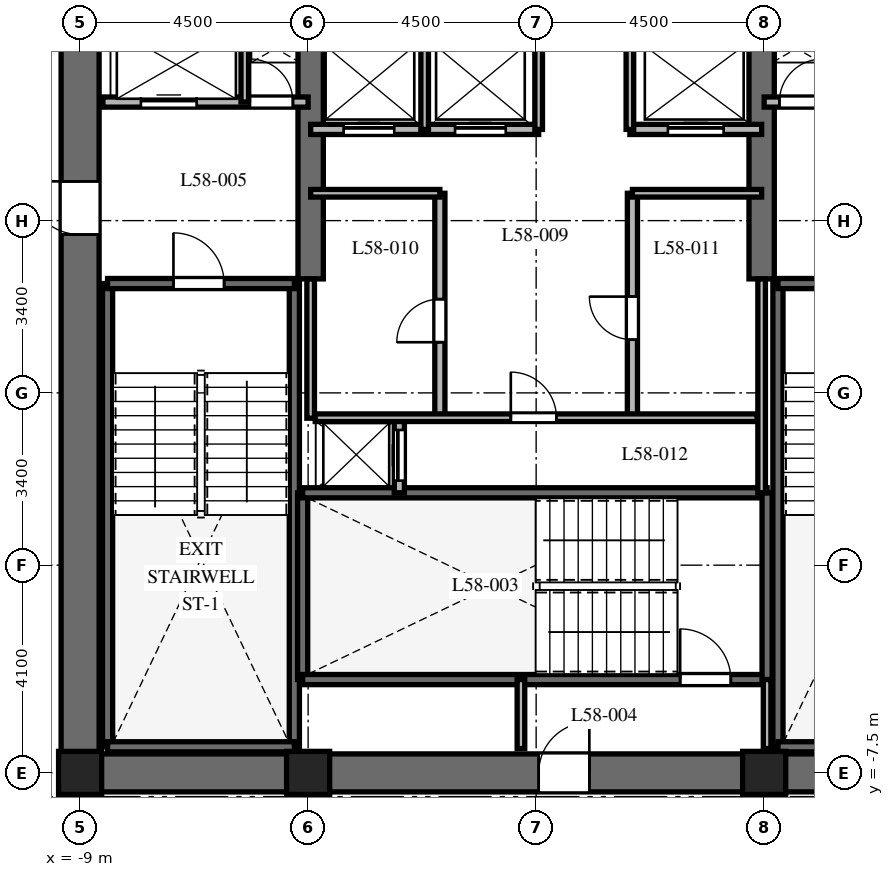
"""IFC4 building model, lengths in metres.
Left out: names, types, materials, properties, quantities, classifications, styles, units other than length and angle.
Written with IfcOpenShell. Run it as: python <this file> out.ifc"""

import sys

from ifc_helpers import new_model, si_unit, direction, frame, frame_2d, origin, origin_2d, place, context, subcontext, project, spatial, rectangle, extrude, element, fill, save


model = new_model("IFC4")
c1 = context("Model", 3, precision=1e-05, world=origin(), true_north=direction((0.0, 1.0)))
c2 = subcontext(c1, "Body", "Model", "MODEL_VIEW")
j1 = project(units=[si_unit("LENGTHUNIT", "METRE"), si_unit("PLANEANGLEUNIT", "RADIAN")], contexts=[c1])
p1 = place(None, origin())
s1 = spatial("IfcSite", under=j1, at=p1, CompositionType="ELEMENT")
p2 = place(p1, origin())
s2 = spatial("IfcBuilding", under=s1, at=p2, CompositionType="ELEMENT")
p3 = place(p2, frame((0.0, 0.0, 233.1)))
s3 = spatial("IfcBuildingStorey", under=s2, at=p3, CompositionType="ELEMENT", Elevation=233.1)
p4 = place(p3, frame((-9.375, -7.5, 0.0), z_axis=(0.0, 0.0, 1.0), x_axis=(1.0, 0.0, 0.0)))
e1 = element("IfcWall", 1, at=p4, inside=s3, PredefinedType="SHEAR", context=c2, shape_type="SweptSolid", body=[
    extrude(rectangle(XDim=18.75, YDim=0.75, at=frame_2d((9.375, 0.0))), origin(), (0.0, 0.0, 1.0), 3.8),
])
p5 = place(p4, frame((9.425, 0.0, 0.0)))
e2 = element("IfcOpeningElement", 2, at=p5, cuts=e1, PredefinedType="OPENING", context=c2, shape_type="SweptSolid", body=[
    extrude(rectangle(XDim=1.0, YDim=2.15, at=frame_2d((0.5, 1.075))), frame((0.0, 0.385, 0.0), z_axis=(0.0, -1.0, 0.0), x_axis=(1.0, 0.0, 0.0)), (0.0, 0.0, 1.0), 0.77),
])
p6 = place(p3, frame((-9.0, -7.125, 0.0), z_axis=(0.0, 0.0, 1.0), x_axis=(0.0, 1.0, 0.0)))
e3 = element("IfcWall", 3, at=p6, inside=s3, PredefinedType="SHEAR", context=c2, shape_type="SweptSolid", body=[
    extrude(rectangle(XDim=14.25, YDim=0.75, at=frame_2d((7.125, 0.0))), origin(), (0.0, 0.0, 1.0), 3.8),
])
p7 = place(p6, frame((10.25, 0.0, 0.0)))
e4 = element("IfcOpeningElement", 4, at=p7, cuts=e3, PredefinedType="OPENING", context=c2, shape_type="SweptSolid", body=[
    extrude(rectangle(XDim=1.05, YDim=2.15, at=frame_2d((0.525, 1.075))), frame((0.0, 0.385, 0.0), z_axis=(0.0, -1.0, 0.0), x_axis=(1.0, 0.0, 0.0)), (0.0, 0.0, 1.0), 0.77),
])
for number, where, z_axis, x_axis in (
    (5, (-4.45, 2.25, 0.0), (0.0, 0.0, 1.0), (0.0, 1.0, 0.0)),
    (6, (4.45, 2.25, 0.0), (0.0, 0.0, 1.0), (0.0, 1.0, 0.0)),
):
    element("IfcWall", number, at=place(p3, frame(where, z_axis=z_axis, x_axis=x_axis)), inside=s3, PredefinedType="SHEAR", context=c2, shape_type="SweptSolid", body=[
        extrude(rectangle(XDim=4.875, YDim=0.5, at=frame_2d((2.438, 0.0))), origin(), (0.0, 0.0, 1.0), 3.8),
    ])
for number, where, z_axis, x_axis in (
    (7, (-8.458, -6.985, 0.0), (0.0, 0.0, 1.0), (0.0, 1.0, 0.0)),
    (8, (-4.772, -6.985, 0.0), (0.0, 0.0, 1.0), (0.0, 1.0, 0.0)),
):
    element("IfcWall", number, at=place(p3, frame(where, z_axis=z_axis, x_axis=x_axis)), inside=s3, PredefinedType="SHEAR", context=c2, shape_type="SweptSolid", body=[
        extrude(rectangle(XDim=9.143, YDim=0.2, at=frame_2d((4.572, 0.0))), origin(), (0.0, 0.0, 1.0), 3.8),
    ])
p8 = place(p3, frame((-8.458, -6.985, 0.0), z_axis=(0.0, 0.0, 1.0), x_axis=(1.0, 0.0, 0.0)))
e9 = element("IfcWall", 9, at=p8, inside=s3, PredefinedType="SHEAR", context=c2, shape_type="SweptSolid", body=[
    extrude(rectangle(XDim=3.686, YDim=0.2, at=frame_2d((1.843, 0.0))), origin(), (0.0, 0.0, 1.0), 3.8),
])
p9 = place(p3, frame((-8.458, 2.158, 0.0), z_axis=(0.0, 0.0, 1.0), x_axis=(1.0, 0.0, 0.0)))
e10 = element("IfcWall", 10, at=p9, inside=s3, PredefinedType="SHEAR", context=c2, shape_type="SweptSolid", body=[
    extrude(rectangle(XDim=3.686, YDim=0.2, at=frame_2d((1.843, 0.0))), origin(), (0.0, 0.0, 1.0), 3.8),
])
p10 = place(p9, frame((1.3, 0.0, 0.0)))
e11 = element("IfcOpeningElement", 11, at=p10, cuts=e10, PredefinedType="OPENING", context=c2, shape_type="SweptSolid", body=[
    extrude(rectangle(XDim=1.0, YDim=2.15, at=frame_2d((0.5, 1.075))), frame((0.0, 0.11, 0.0), z_axis=(0.0, -1.0, 0.0), x_axis=(1.0, 0.0, 0.0)), (0.0, 0.0, 1.0), 0.22),
])
p11 = place(p3, frame((4.772, -6.985, 0.0), z_axis=(0.0, 0.0, 1.0), x_axis=(0.0, 1.0, 0.0)))
e12 = element("IfcWall", 12, at=p11, inside=s3, PredefinedType="SHEAR", context=c2, shape_type="SweptSolid", body=[
    extrude(rectangle(XDim=9.143, YDim=0.2, at=frame_2d((4.572, 0.0))), origin(), (0.0, 0.0, 1.0), 3.8),
])
p12 = place(p3, frame((4.772, -6.985, 0.0), z_axis=(0.0, 0.0, 1.0), x_axis=(1.0, 0.0, 0.0)))
e13 = element("IfcWall", 13, at=p12, inside=s3, PredefinedType="SHEAR", context=c2, shape_type="SweptSolid", body=[
    extrude(rectangle(XDim=3.686, YDim=0.2, at=frame_2d((1.843, 0.0))), origin(), (0.0, 0.0, 1.0), 3.8),
])
p13 = place(p3, frame((4.772, 2.158, 0.0), z_axis=(0.0, 0.0, 1.0), x_axis=(1.0, 0.0, 0.0)))
e14 = element("IfcWall", 14, at=p13, inside=s3, PredefinedType="SHEAR", context=c2, shape_type="SweptSolid", body=[
    extrude(rectangle(XDim=3.686, YDim=0.2, at=frame_2d((1.843, 0.0))), origin(), (0.0, 0.0, 1.0), 3.8),
])
p14 = place(p13, frame((1.35, 0.0, 0.0)))
e15 = element("IfcOpeningElement", 15, at=p14, cuts=e14, PredefinedType="OPENING", context=c2, shape_type="SweptSolid", body=[
    extrude(rectangle(XDim=1.0, YDim=2.15, at=frame_2d((0.5, 1.075))), frame((0.0, 0.11, 0.0), z_axis=(0.0, -1.0, 0.0), x_axis=(1.0, 0.0, 0.0)), (0.0, 0.0, 1.0), 0.22),
])
p15 = place(p3, frame((-4.608, -5.658, 0.0), z_axis=(0.0, 0.0, 1.0), x_axis=(0.0, 1.0, 0.0)))
e16 = element("IfcWall", 16, at=p15, inside=s3, PredefinedType="SHEAR", context=c2, shape_type="SweptSolid", body=[
    extrude(rectangle(XDim=3.686, YDim=0.2, at=frame_2d((1.843, 0.0))), origin(), (0.0, 0.0, 1.0), 3.8),
])
p16 = place(p3, frame((-4.608, -5.658, 0.0), z_axis=(0.0, 0.0, 1.0), x_axis=(1.0, 0.0, 0.0)))
e17 = element("IfcWall", 17, at=p16, inside=s3, PredefinedType="SHEAR", context=c2, shape_type="SweptSolid", body=[
    extrude(rectangle(XDim=9.166, YDim=0.2, at=frame_2d((4.583, 0.0))), origin(), (0.0, 0.0, 1.0), 3.8),
])
p17 = place(p16, frame((7.45, 0.0, 0.0)))
e18 = element("IfcOpeningElement", 18, at=p17, cuts=e17, PredefinedType="OPENING", context=c2, shape_type="SweptSolid", body=[
    extrude(rectangle(XDim=1.0, YDim=2.15, at=frame_2d((0.5, 1.075))), frame((0.0, 0.11, 0.0), z_axis=(0.0, -1.0, 0.0), x_axis=(1.0, 0.0, 0.0)), (0.0, 0.0, 1.0), 0.22),
])
p18 = place(p3, frame((-4.608, -1.972, 0.0), z_axis=(0.0, 0.0, 1.0), x_axis=(1.0, 0.0, 0.0)))
e19 = element("IfcWall", 19, at=p18, inside=s3, PredefinedType="SHEAR", context=c2, shape_type="SweptSolid", body=[
    extrude(rectangle(XDim=9.166, YDim=0.2, at=frame_2d((4.583, 0.0))), origin(), (0.0, 0.0, 1.0), 3.8),
])
p19 = place(p3, frame((4.558, -5.658, 0.0), z_axis=(0.0, 0.0, 1.0), x_axis=(0.0, 1.0, 0.0)))
e20 = element("IfcWall", 20, at=p19, inside=s3, PredefinedType="SHEAR", context=c2, shape_type="SweptSolid", body=[
    extrude(rectangle(XDim=3.686, YDim=0.2, at=frame_2d((1.843, 0.0))), origin(), (0.0, 0.0, 1.0), 3.8),
])
for number, where, z_axis, x_axis in (
    (21, (-9.0, -7.5, 0.0), (0.0, 0.0, 1.0), (1.0, 0.0, 0.0)),
    (22, (-4.5, -7.5, 0.0), (0.0, 0.0, 1.0), (1.0, 0.0, 0.0)),
    (23, (4.5, -7.5, 0.0), (0.0, 0.0, 1.0), (1.0, 0.0, 0.0)),
):
    element("IfcColumn", number, at=place(p3, frame(where, z_axis=z_axis, x_axis=x_axis)), inside=s3, PredefinedType="COLUMN", context=c2, shape_type="SweptSolid", body=[
        extrude(rectangle(XDim=0.85, YDim=0.85, at=origin_2d()), origin(), (0.0, 0.0, 1.0), 3.8),
    ])
for number, where, z_axis, x_axis in (
    (24, (-0.3, -7.02, 0.0), (0.0, 0.0, 1.0), (0.0, 1.0, 0.0)),
    (25, (4.558, -7.02, 0.0), (0.0, 0.0, 1.0), (0.0, 1.0, 0.0)),
):
    element("IfcWall", number, at=place(p3, frame(where, z_axis=z_axis, x_axis=x_axis)), inside=s3, PredefinedType="PARTITIONING", context=c2, shape_type="SweptSolid", body=[
        extrude(rectangle(XDim=1.362, YDim=0.15, at=frame_2d((0.681, 0.0))), origin(), (0.0, 0.0, 1.0), 3.5),
    ])
p20 = place(p3, frame((-8.55, 5.74, 0.0), z_axis=(0.0, 0.0, 1.0), x_axis=(1.0, 0.0, 0.0)))
e26 = element("IfcWall", 26, at=p20, inside=s3, PredefinedType="PARTITIONING", context=c2, shape_type="SweptSolid", body=[
    extrude(rectangle(XDim=4.05, YDim=0.2, at=frame_2d((2.025, 0.0))), origin(), (0.0, 0.0, 1.0), 3.5),
])
p21 = place(p20, frame((0.75, 0.0, 0.0)))
e27 = element("IfcOpeningElement", 27, at=p21, cuts=e26, PredefinedType="OPENING", context=c2, shape_type="SweptSolid", body=[
    extrude(rectangle(XDim=1.1, YDim=2.2, at=frame_2d((0.55, 1.1))), frame((0.0, 0.11, 0.0), z_axis=(0.0, -1.0, 0.0), x_axis=(1.0, 0.0, 0.0)), (0.0, 0.0, 1.0), 0.22),
])
p22 = place(p20, frame((2.9, 0.0, 0.0)))
e28 = element("IfcOpeningElement", 28, at=p22, cuts=e26, PredefinedType="OPENING", context=c2, shape_type="SweptSolid", body=[
    extrude(rectangle(XDim=0.85, YDim=2.03, at=frame_2d((0.425, 1.015))), frame((0.0, 0.11, 0.0), z_axis=(0.0, -1.0, 0.0), x_axis=(1.0, 0.0, 0.0)), (0.0, 0.0, 1.0), 0.22),
])
p23 = place(p3, frame((-5.75, 5.74, 0.0), z_axis=(0.0, 0.0, 1.0), x_axis=(0.0, 1.0, 0.0)))
e29 = element("IfcWall", 29, at=p23, inside=s3, PredefinedType="PARTITIONING", context=c2, shape_type="SweptSolid", body=[
    extrude(rectangle(XDim=1.41, YDim=0.15, at=frame_2d((0.705, 0.0))), origin(), (0.0, 0.0, 1.0), 3.5),
])
p24 = place(p3, frame((4.5, 5.74, 0.0), z_axis=(0.0, 0.0, 1.0), x_axis=(1.0, 0.0, 0.0)))
e30 = element("IfcWall", 30, at=p24, inside=s3, PredefinedType="PARTITIONING", context=c2, shape_type="SweptSolid", body=[
    extrude(rectangle(XDim=4.05, YDim=0.2, at=frame_2d((2.025, 0.0))), origin(), (0.0, 0.0, 1.0), 3.5),
])
p25 = place(p24, frame((0.3, 0.0, 0.0)))
e31 = element("IfcOpeningElement", 31, at=p25, cuts=e30, PredefinedType="OPENING", context=c2, shape_type="SweptSolid", body=[
    extrude(rectangle(XDim=0.85, YDim=2.03, at=frame_2d((0.425, 1.015))), frame((0.0, 0.11, 0.0), z_axis=(0.0, -1.0, 0.0), x_axis=(1.0, 0.0, 0.0)), (0.0, 0.0, 1.0), 0.22),
])
p26 = place(p24, frame((2.15, 0.0, 0.0)))
e32 = element("IfcOpeningElement", 32, at=p26, cuts=e30, PredefinedType="OPENING", context=c2, shape_type="SweptSolid", body=[
    extrude(rectangle(XDim=1.1, YDim=2.2, at=frame_2d((0.55, 1.1))), frame((0.0, 0.11, 0.0), z_axis=(0.0, -1.0, 0.0), x_axis=(1.0, 0.0, 0.0)), (0.0, 0.0, 1.0), 0.22),
])
p27 = place(p3, frame((-2.7, -1.972, 0.0), z_axis=(0.0, 0.0, 1.0), x_axis=(0.0, 1.0, 0.0)))
e33 = element("IfcWall", 33, at=p27, inside=s3, PredefinedType="PARTITIONING", context=c2, shape_type="SweptSolid", body=[
    extrude(rectangle(XDim=1.472, YDim=0.2, at=frame_2d((0.736, 0.0))), origin(), (0.0, 0.0, 1.0), 3.5),
])
p28 = place(p27, frame((0.24, 0.0, 0.0)))
e34 = element("IfcOpeningElement", 34, at=p28, cuts=e33, PredefinedType="OPENING", context=c2, shape_type="SweptSolid", body=[
    extrude(rectangle(XDim=1.0, YDim=2.2, at=frame_2d((0.5, 1.1))), frame((0.0, 0.11, 0.0), z_axis=(0.0, -1.0, 0.0), x_axis=(1.0, 0.0, 0.0)), (0.0, 0.0, 1.0), 0.22),
])
p29 = place(p3, frame((-4.45, 5.2, 0.0), z_axis=(0.0, 0.0, 1.0), x_axis=(1.0, 0.0, 0.0)))
e35 = element("IfcWall", 35, at=p29, inside=s3, PredefinedType="PARTITIONING", context=c2, shape_type="SweptSolid", body=[
    extrude(rectangle(XDim=4.5, YDim=0.2, at=frame_2d((2.25, 0.0))), origin(), (0.0, 0.0, 1.0), 3.5),
])
p30 = place(p29, frame((0.65, 0.0, 0.0)))
e36 = element("IfcOpeningElement", 36, at=p30, cuts=e35, PredefinedType="OPENING", context=c2, shape_type="SweptSolid", body=[
    extrude(rectangle(XDim=1.0, YDim=2.2, at=frame_2d((0.5, 1.1))), frame((0.0, 0.11, 0.0), z_axis=(0.0, -1.0, 0.0), x_axis=(1.0, 0.0, 0.0)), (0.0, 0.0, 1.0), 0.22),
])
p31 = place(p29, frame((2.85, 0.0, 0.0)))
e37 = element("IfcOpeningElement", 37, at=p31, cuts=e35, PredefinedType="OPENING", context=c2, shape_type="SweptSolid", body=[
    extrude(rectangle(XDim=1.0, YDim=2.2, at=frame_2d((0.5, 1.1))), frame((0.0, 0.11, 0.0), z_axis=(0.0, -1.0, 0.0), x_axis=(1.0, 0.0, 0.0)), (0.0, 0.0, 1.0), 0.22),
])
p32 = place(p3, frame((1.85, 5.2, 0.0), z_axis=(0.0, 0.0, 1.0), x_axis=(1.0, 0.0, 0.0)))
e38 = element("IfcWall", 38, at=p32, inside=s3, PredefinedType="PARTITIONING", context=c2, shape_type="SweptSolid", body=[
    extrude(rectangle(XDim=2.6, YDim=0.2, at=frame_2d((1.3, 0.0))), origin(), (0.0, 0.0, 1.0), 3.5),
])
p33 = place(p32, frame((0.75, 0.0, 0.0)))
e39 = element("IfcOpeningElement", 39, at=p33, cuts=e38, PredefinedType="OPENING", context=c2, shape_type="SweptSolid", body=[
    extrude(rectangle(XDim=1.1, YDim=2.2, at=frame_2d((0.55, 1.1))), frame((0.0, 0.11, 0.0), z_axis=(0.0, -1.0, 0.0), x_axis=(1.0, 0.0, 0.0)), (0.0, 0.0, 1.0), 0.22),
])
p34 = place(p3, frame((-2.2, 5.2, 0.0), z_axis=(0.0, 0.0, 1.0), x_axis=(0.0, 1.0, 0.0)))
e40 = element("IfcWall", 40, at=p34, inside=s3, PredefinedType="PARTITIONING", context=c2, shape_type="SweptSolid", body=[
    extrude(rectangle(XDim=1.85, YDim=0.15, at=frame_2d((0.925, 0.0))), origin(), (0.0, 0.0, 1.0), 3.5),
])
for number, where, z_axis, x_axis in (
    (41, (0.05, 5.2, 0.0), (0.0, 0.0, 1.0), (0.0, 1.0, 0.0)),
    (42, (1.85, 5.2, 0.0), (0.0, 0.0, 1.0), (0.0, 1.0, 0.0)),
):
    element("IfcWall", number, at=place(p3, frame(where, z_axis=z_axis, x_axis=x_axis)), inside=s3, PredefinedType="PARTITIONING", context=c2, shape_type="SweptSolid", body=[
        extrude(rectangle(XDim=1.95, YDim=0.15, at=frame_2d((0.975, 0.0))), origin(), (0.0, 0.0, 1.0), 3.5),
    ])
p35 = place(p3, frame((-4.45, -0.5, 0.0), z_axis=(0.0, 0.0, 1.0), x_axis=(0.0, 1.0, 0.0)))
e43 = element("IfcWall", 43, at=p35, inside=s3, PredefinedType="PARTITIONING", context=c2, shape_type="SweptSolid", body=[
    extrude(rectangle(XDim=2.75, YDim=0.15, at=frame_2d((1.375, 0.0))), origin(), (0.0, 0.0, 1.0), 3.5),
])
p36 = place(p3, frame((4.45, -1.972, 0.0), z_axis=(0.0, 0.0, 1.0), x_axis=(0.0, 1.0, 0.0)))
e44 = element("IfcWall", 44, at=p36, inside=s3, PredefinedType="PARTITIONING", context=c2, shape_type="SweptSolid", body=[
    extrude(rectangle(XDim=4.222, YDim=0.15, at=frame_2d((2.111, 0.0))), origin(), (0.0, 0.0, 1.0), 3.5),
])
p37 = place(p3, frame((-1.9, -0.5, 0.0), z_axis=(0.0, 0.0, 1.0), x_axis=(0.0, 1.0, 0.0)))
e45 = element("IfcWall", 45, at=p37, inside=s3, PredefinedType="PARTITIONING", context=c2, shape_type="SweptSolid", body=[
    extrude(rectangle(XDim=4.44, YDim=0.2, at=frame_2d((2.22, 0.0))), origin(), (0.0, 0.0, 1.0), 3.5),
])
p38 = place(p37, frame((1.5, 0.0, 0.0)))
e46 = element("IfcOpeningElement", 46, at=p38, cuts=e45, PredefinedType="OPENING", context=c2, shape_type="SweptSolid", body=[
    extrude(rectangle(XDim=0.85, YDim=2.03, at=frame_2d((0.425, 1.015))), frame((0.0, 0.11, 0.0), z_axis=(0.0, -1.0, 0.0), x_axis=(1.0, 0.0, 0.0)), (0.0, 0.0, 1.0), 0.22),
])
p39 = place(p3, frame((-4.45, 3.94, 0.0), z_axis=(0.0, 0.0, 1.0), x_axis=(1.0, 0.0, 0.0)))
e47 = element("IfcWall", 47, at=p39, inside=s3, PredefinedType="PARTITIONING", context=c2, shape_type="SweptSolid", body=[
    extrude(rectangle(XDim=2.55, YDim=0.15, at=frame_2d((1.275, 0.0))), origin(), (0.0, 0.0, 1.0), 3.5),
])
p40 = place(p3, frame((1.9, -0.5, 0.0), z_axis=(0.0, 0.0, 1.0), x_axis=(0.0, 1.0, 0.0)))
e48 = element("IfcWall", 48, at=p40, inside=s3, PredefinedType="PARTITIONING", context=c2, shape_type="SweptSolid", body=[
    extrude(rectangle(XDim=4.44, YDim=0.2, at=frame_2d((2.22, 0.0))), origin(), (0.0, 0.0, 1.0), 3.5),
])
p41 = place(p40, frame((1.55, 0.0, 0.0)))
e49 = element("IfcOpeningElement", 49, at=p41, cuts=e48, PredefinedType="OPENING", context=c2, shape_type="SweptSolid", body=[
    extrude(rectangle(XDim=0.85, YDim=2.03, at=frame_2d((0.425, 1.015))), frame((0.0, 0.11, 0.0), z_axis=(0.0, -1.0, 0.0), x_axis=(1.0, 0.0, 0.0)), (0.0, 0.0, 1.0), 0.22),
])
p42 = place(p3, frame((1.9, 3.94, 0.0), z_axis=(0.0, 0.0, 1.0), x_axis=(1.0, 0.0, 0.0)))
e50 = element("IfcWall", 50, at=p42, inside=s3, PredefinedType="PARTITIONING", context=c2, shape_type="SweptSolid", body=[
    extrude(rectangle(XDim=2.55, YDim=0.15, at=frame_2d((1.275, 0.0))), origin(), (0.0, 0.0, 1.0), 3.5),
])
p43 = place(p3, frame((-4.36, -0.49, 0.0), z_axis=(0.0, 0.0, 1.0), x_axis=(1.0, 0.0, 0.0)))
e51 = element("IfcWall", 51, at=p43, inside=s3, PredefinedType="PARTITIONING", context=c2, shape_type="SweptSolid", body=[
    extrude(rectangle(XDim=8.72, YDim=0.15, at=frame_2d((4.36, 0.0))), origin(), (0.0, 0.0, 1.0), 3.5),
])
p44 = place(p43, frame((3.86, 0.0, 0.0)))
e52 = element("IfcOpeningElement", 52, at=p44, cuts=e51, PredefinedType="OPENING", context=c2, shape_type="SweptSolid", body=[
    extrude(rectangle(XDim=0.9, YDim=2.03, at=frame_2d((0.45, 1.015))), frame((0.0, 0.085, 0.0), z_axis=(0.0, -1.0, 0.0), x_axis=(1.0, 0.0, 0.0)), (0.0, 0.0, 1.0), 0.17),
])
p45 = place(p10, origin())
e53 = element("IfcDoor", 53, at=p45, inside=s3, OperationType="SINGLE_SWING_LEFT", PredefinedType="DOOR", context=c2, shape_type="SweptSolid", body=[
    extrude(rectangle(XDim=1.0, YDim=2.15, at=frame_2d((0.5, 1.075))), frame((0.0, 0.025, 0.0), z_axis=(0.0, -1.0, 0.0), x_axis=(1.0, 0.0, 0.0)), (0.0, 0.0, 1.0), 0.05),
])
fill(e11, e53)
p46 = place(p17, origin())
e54 = element("IfcDoor", 54, at=p46, inside=s3, OperationType="SINGLE_SWING_LEFT", PredefinedType="DOOR", context=c2, shape_type="SweptSolid", body=[
    extrude(rectangle(XDim=1.0, YDim=2.15, at=frame_2d((0.5, 1.075))), frame((0.0, 0.025, 0.0), z_axis=(0.0, -1.0, 0.0), x_axis=(1.0, 0.0, 0.0)), (0.0, 0.0, 1.0), 0.05),
])
fill(e18, e54)
p47 = place(p5, origin())
e55 = element("IfcDoor", 55, at=p47, inside=s3, OperationType="SINGLE_SWING_RIGHT", PredefinedType="DOOR", context=c2, shape_type="SweptSolid", body=[
    extrude(rectangle(XDim=1.0, YDim=2.15, at=frame_2d((0.5, 1.075))), frame((0.0, 0.025, 0.0), z_axis=(0.0, -1.0, 0.0), x_axis=(1.0, 0.0, 0.0)), (0.0, 0.0, 1.0), 0.05),
])
fill(e2, e55)
p48 = place(p7, origin())
e56 = element("IfcDoor", 56, at=p48, inside=s3, OperationType="SINGLE_SWING_RIGHT", PredefinedType="DOOR", context=c2, shape_type="SweptSolid", body=[
    extrude(rectangle(XDim=1.05, YDim=2.15, at=frame_2d((0.525, 1.075))), frame((0.0, 0.025, 0.0), z_axis=(0.0, -1.0, 0.0), x_axis=(1.0, 0.0, 0.0)), (0.0, 0.0, 1.0), 0.05),
])
fill(e4, e56)
p49 = place(p21, origin())
e57 = element("IfcDoor", 57, at=p49, inside=s3, OperationType="SLIDING_TO_LEFT", PredefinedType="DOOR", context=c2, shape_type="SweptSolid", body=[
    extrude(rectangle(XDim=1.1, YDim=2.2, at=frame_2d((0.55, 1.1))), frame((0.0, 0.025, 0.0), z_axis=(0.0, -1.0, 0.0), x_axis=(1.0, 0.0, 0.0)), (0.0, 0.0, 1.0), 0.05),
])
fill(e27, e57)
p50 = place(p22, origin())
e58 = element("IfcDoor", 58, at=p50, inside=s3, OperationType="SINGLE_SWING_LEFT", PredefinedType="DOOR", context=c2, shape_type="SweptSolid", body=[
    extrude(rectangle(XDim=0.85, YDim=2.03, at=frame_2d((0.425, 1.015))), frame((0.0, 0.025, 0.0), z_axis=(0.0, -1.0, 0.0), x_axis=(1.0, 0.0, 0.0)), (0.0, 0.0, 1.0), 0.05),
])
fill(e28, e58)
p51 = place(p25, origin())
e59 = element("IfcDoor", 59, at=p51, inside=s3, OperationType="SINGLE_SWING_RIGHT", PredefinedType="DOOR", context=c2, shape_type="SweptSolid", body=[
    extrude(rectangle(XDim=0.85, YDim=2.03, at=frame_2d((0.425, 1.015))), frame((0.0, 0.025, 0.0), z_axis=(0.0, -1.0, 0.0), x_axis=(1.0, 0.0, 0.0)), (0.0, 0.0, 1.0), 0.05),
])
fill(e31, e59)
p52 = place(p28, origin())
e60 = element("IfcDoor", 60, at=p52, inside=s3, OperationType="SLIDING_TO_LEFT", PredefinedType="DOOR", context=c2, shape_type="SweptSolid", body=[
    extrude(rectangle(XDim=1.0, YDim=2.2, at=frame_2d((0.5, 1.1))), frame((0.0, 0.025, 0.0), z_axis=(0.0, -1.0, 0.0), x_axis=(1.0, 0.0, 0.0)), (0.0, 0.0, 1.0), 0.05),
])
fill(e34, e60)
p53 = place(p30, origin())
e61 = element("IfcDoor", 61, at=p53, inside=s3, OperationType="SLIDING_TO_LEFT", PredefinedType="DOOR", context=c2, shape_type="SweptSolid", body=[
    extrude(rectangle(XDim=1.0, YDim=2.2, at=frame_2d((0.5, 1.1))), frame((0.0, 0.025, 0.0), z_axis=(0.0, -1.0, 0.0), x_axis=(1.0, 0.0, 0.0)), (0.0, 0.0, 1.0), 0.05),
])
fill(e36, e61)
p54 = place(p31, origin())
e62 = element("IfcDoor", 62, at=p54, inside=s3, OperationType="SLIDING_TO_RIGHT", PredefinedType="DOOR", context=c2, shape_type="SweptSolid", body=[
    extrude(rectangle(XDim=1.0, YDim=2.2, at=frame_2d((0.5, 1.1))), frame((0.0, 0.025, 0.0), z_axis=(0.0, -1.0, 0.0), x_axis=(1.0, 0.0, 0.0)), (0.0, 0.0, 1.0), 0.05),
])
fill(e37, e62)
p55 = place(p33, origin())
e63 = element("IfcDoor", 63, at=p55, inside=s3, OperationType="SLIDING_TO_RIGHT", PredefinedType="DOOR", context=c2, shape_type="SweptSolid", body=[
    extrude(rectangle(XDim=1.1, YDim=2.2, at=frame_2d((0.55, 1.1))), frame((0.0, 0.025, 0.0), z_axis=(0.0, -1.0, 0.0), x_axis=(1.0, 0.0, 0.0)), (0.0, 0.0, 1.0), 0.05),
])
fill(e39, e63)
p56 = place(p38, origin())
e64 = element("IfcDoor", 64, at=p56, inside=s3, OperationType="SINGLE_SWING_LEFT", PredefinedType="DOOR", context=c2, shape_type="SweptSolid", body=[
    extrude(rectangle(XDim=0.85, YDim=2.03, at=frame_2d((0.425, 1.015))), frame((0.0, 0.025, 0.0), z_axis=(0.0, -1.0, 0.0), x_axis=(1.0, 0.0, 0.0)), (0.0, 0.0, 1.0), 0.05),
])
fill(e46, e64)
p57 = place(p41, origin())
e65 = element("IfcDoor", 65, at=p57, inside=s3, OperationType="SINGLE_SWING_RIGHT", PredefinedType="DOOR", context=c2, shape_type="SweptSolid", body=[
    extrude(rectangle(XDim=0.85, YDim=2.03, at=frame_2d((0.425, 1.015))), frame((0.0, 0.025, 0.0), z_axis=(0.0, -1.0, 0.0), x_axis=(1.0, 0.0, 0.0)), (0.0, 0.0, 1.0), 0.05),
])
fill(e49, e65)
p58 = place(p44, origin())
e66 = element("IfcDoor", 66, at=p58, inside=s3, OperationType="SINGLE_SWING_LEFT", PredefinedType="DOOR", context=c2, shape_type="SweptSolid", body=[
    extrude(rectangle(XDim=0.9, YDim=2.03, at=frame_2d((0.45, 1.015))), frame((0.0, 0.025, 0.0), z_axis=(0.0, -1.0, 0.0), x_axis=(1.0, 0.0, 0.0)), (0.0, 0.0, 1.0), 0.05),
])
fill(e52, e66)
save(model, sys.argv[1])
